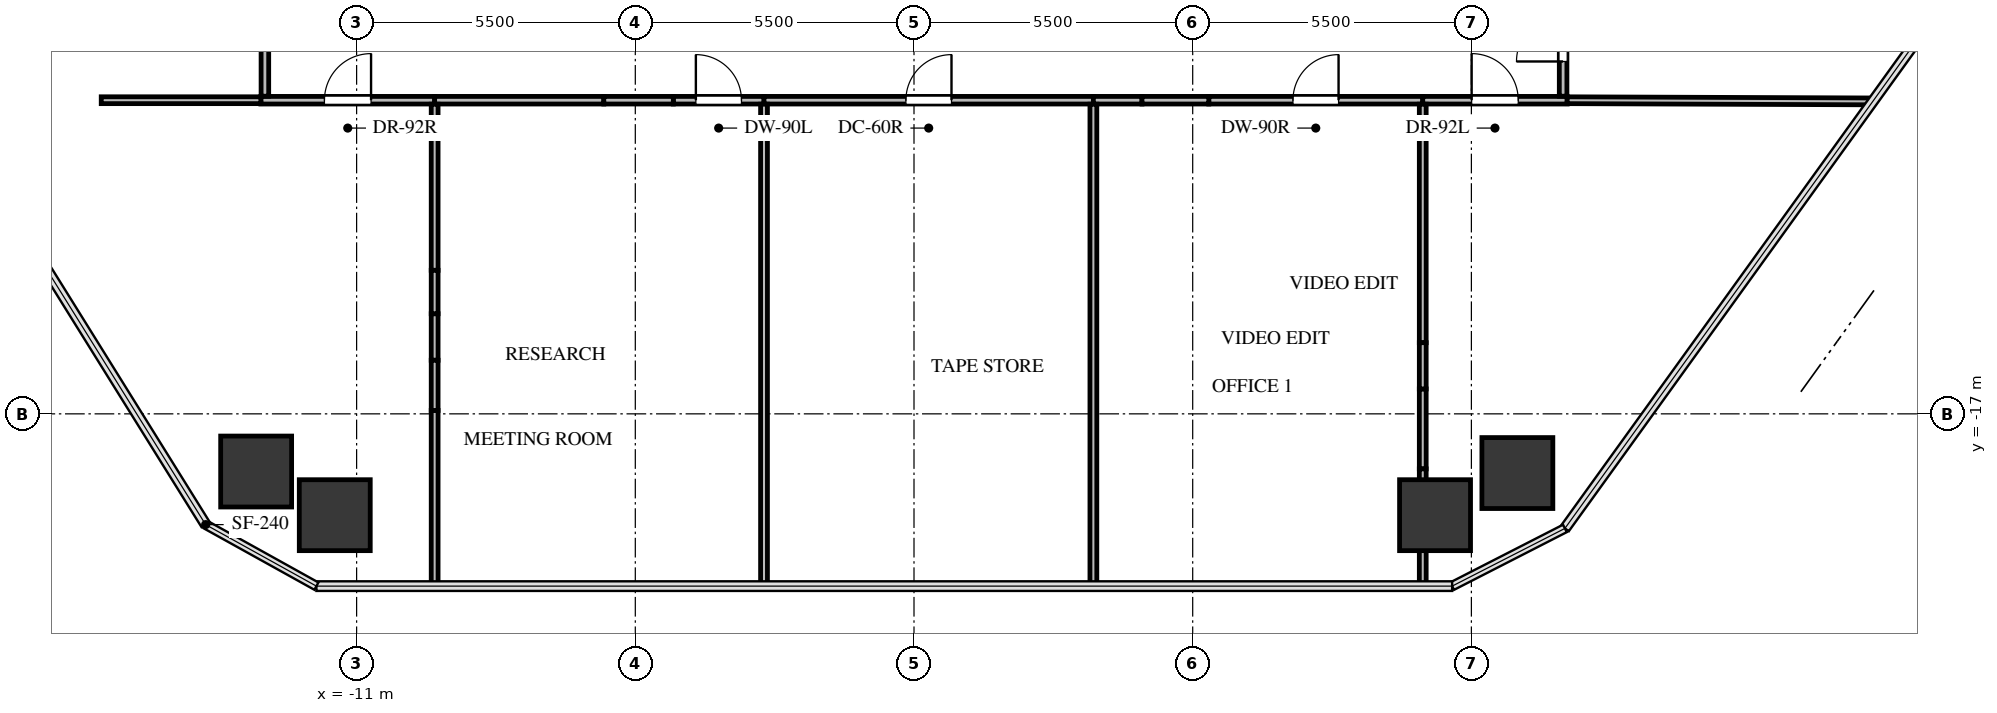
"""IFC4 building model, lengths in metres.
Left out: names, types, materials, properties, quantities, classifications, styles, units other than length and angle.
Written with IfcOpenShell. Run it as: python <this file> out.ifc"""

import sys

from ifc_helpers import new_model, si_unit, direction, frame, frame_2d, origin, origin_2d, place, context, subcontext, project, spatial, rectangle, extrude, source, transform, mapped, element, fill, save


model = new_model("IFC4")
c1 = context("Model", 3, precision=1e-05, world=origin(), true_north=direction((0.0, 1.0)))
c2 = subcontext(c1, "Body", "Model", "MODEL_VIEW")
j1 = project(units=[si_unit("LENGTHUNIT", "METRE"), si_unit("PLANEANGLEUNIT", "RADIAN")], contexts=[c1])
p1 = place(None, origin())
s1 = spatial("IfcSite", under=j1, at=p1, CompositionType="ELEMENT")
p2 = place(p1, origin())
s2 = spatial("IfcBuilding", under=s1, at=p2, CompositionType="ELEMENT")
p3 = place(p2, frame((0.0, 0.0, 39.0)))
s3 = spatial("IfcBuildingStorey", under=s2, at=p3, CompositionType="ELEMENT", Elevation=39.0)
m1 = source(origin(), c2, "Body", "SweptSolid", [
    extrude(rectangle(XDim=1.4, YDim=1.4, at=origin_2d()), origin(), (0.0, 0.0, 1.0), 3.3),
])
for number, where, z_axis, x_axis in (
    (1, (-12.983, -18.138, -0.24), (0.0, 0.0, 1.0), (1.0, 0.0, 0.0)),
    (2, (11.907, -18.168, -0.24), (0.0, 0.0, 1.0), (1.0, 0.0, 0.0)),
    (3, (10.283, -19.0, -0.24), (0.0, 0.0, 1.0), (1.0, 0.0, 0.0)),
    (4, (-11.431, -19.0, -0.24), (0.0, 0.0, 1.0), (1.0, 0.0, 0.0)),
):
    element("IfcColumn", number, at=place(p3, frame(where, z_axis=z_axis, x_axis=x_axis)), inside=s3, PredefinedType="COLUMN", context=c2, shape_type="MappedRepresentation", body=[
        mapped(m1, transform((0.0, 0.0, 0.0), x_axis=(1.0, 0.0, 0.0), y_axis=(0.0, 1.0, 0.0), z_axis=(0.0, 0.0, 1.0), scale=1.0)),
    ])
p4 = place(p3, frame((-12.89, -10.81, 0.0), z_axis=(0.0, 0.0, 1.0), x_axis=(1.0, 0.0, 0.0)))
e5 = element("IfcWall", 5, at=p4, inside=s3, PredefinedType="PARTITIONING", context=c2, shape_type="SweptSolid", body=[
    extrude(rectangle(XDim=3.43, YDim=0.15, at=frame_2d((1.715, 0.0))), origin(), (0.0, 0.0, 1.0), 3.045),
])
p5 = place(p4, frame((1.255, 0.0, 0.0)))
e6 = element("IfcOpeningElement", 6, at=p5, cuts=e5, PredefinedType="OPENING", context=c2, shape_type="SweptSolid", body=[
    extrude(rectangle(XDim=0.92, YDim=2.1, at=frame_2d((0.46, 1.05))), frame((0.0, 0.085, 0.0), z_axis=(0.0, -1.0, 0.0), x_axis=(1.0, 0.0, 0.0)), (0.0, 0.0, 1.0), 0.17),
])
p6 = place(p3, frame((-9.46, -10.81, 0.0), z_axis=(0.0, 0.0, 1.0), x_axis=(1.0, 0.0, 0.0)))
e7 = element("IfcWall", 7, at=p6, inside=s3, PredefinedType="PARTITIONING", context=c2, shape_type="SweptSolid", body=[
    extrude(rectangle(XDim=3.338, YDim=0.15, at=frame_2d((1.669, 0.0))), origin(), (0.0, 0.0, 1.0), 2.13),
])
p7 = place(p3, frame((-4.75, -10.81, 0.0), z_axis=(0.0, 0.0, 1.0), x_axis=(1.0, 0.0, 0.0)))
e8 = element("IfcWall", 8, at=p7, inside=s3, PredefinedType="PARTITIONING", context=c2, shape_type="SweptSolid", body=[
    extrude(rectangle(XDim=1.79, YDim=0.15, at=frame_2d((0.895, 0.0))), origin(), (0.0, 0.0, 1.0), 3.045),
])
p8 = place(p7, frame((0.445, 0.0, 0.0)))
e9 = element("IfcOpeningElement", 9, at=p8, cuts=e8, PredefinedType="OPENING", context=c2, shape_type="SweptSolid", body=[
    extrude(rectangle(XDim=0.9, YDim=2.05, at=frame_2d((0.45, 1.025))), frame((0.0, 0.085, 0.0), z_axis=(0.0, -1.0, 0.0), x_axis=(1.0, 0.0, 0.0)), (0.0, 0.0, 1.0), 0.17),
])
p9 = place(p3, frame((-6.122, -10.81, 0.0), z_axis=(0.0, 0.0, 1.0), x_axis=(1.0, 0.0, 0.0)))
e10 = element("IfcWall", 10, at=p9, inside=s3, PredefinedType="PARTITIONING", context=c2, shape_type="SweptSolid", body=[
    extrude(rectangle(XDim=1.372, YDim=0.15, at=frame_2d((0.686, 0.0))), origin(), (0.0, 0.0, 1.0), 2.13),
])
p10 = place(p3, frame((-2.96, -10.81, 0.0), z_axis=(0.0, 0.0, 1.0), x_axis=(1.0, 0.0, 0.0)))
e11 = element("IfcWall", 11, at=p10, inside=s3, PredefinedType="PARTITIONING", context=c2, shape_type="SweptSolid", body=[
    extrude(rectangle(XDim=6.5, YDim=0.15, at=frame_2d((3.25, 0.0))), origin(), (0.0, 0.0, 1.0), 3.045),
])
p11 = place(p10, frame((2.8, 0.0, 0.0)))
e12 = element("IfcOpeningElement", 12, at=p11, cuts=e11, PredefinedType="OPENING", context=c2, shape_type="SweptSolid", body=[
    extrude(rectangle(XDim=0.9, YDim=2.05, at=frame_2d((0.45, 1.025))), frame((0.0, 0.085, 0.0), z_axis=(0.0, -1.0, 0.0), x_axis=(1.0, 0.0, 0.0)), (0.0, 0.0, 1.0), 0.17),
])
p12 = place(p3, frame((3.54, -10.81, 0.0), z_axis=(0.0, 0.0, 1.0), x_axis=(1.0, 0.0, 0.0)))
e13 = element("IfcWall", 13, at=p12, inside=s3, PredefinedType="PARTITIONING", context=c2, shape_type="SweptSolid", body=[
    extrude(rectangle(XDim=0.959, YDim=0.15, at=frame_2d((0.479, 0.0))), origin(), (0.0, 0.0, 1.0), 3.045),
])
p13 = place(p3, frame((5.817, -10.81, 0.0), z_axis=(0.0, 0.0, 1.0), x_axis=(1.0, 0.0, 0.0)))
e14 = element("IfcWall", 14, at=p13, inside=s3, PredefinedType="PARTITIONING", context=c2, shape_type="SweptSolid", body=[
    extrude(rectangle(XDim=4.223, YDim=0.15, at=frame_2d((2.111, 0.0))), origin(), (0.0, 0.0, 1.0), 2.13),
])
p14 = place(p13, frame((1.661, 0.0, 0.0)))
e15 = element("IfcOpeningElement", 15, at=p14, cuts=e14, PredefinedType="OPENING", context=c2, shape_type="SweptSolid", body=[
    extrude(rectangle(XDim=0.9, YDim=2.05, at=frame_2d((0.45, 1.025))), frame((0.0, 0.085, 0.0), z_axis=(0.0, -1.0, 0.0), x_axis=(1.0, 0.0, 0.0)), (0.0, 0.0, 1.0), 0.17),
])
p15 = place(p3, frame((4.499, -10.81, 0.0), z_axis=(0.0, 0.0, 1.0), x_axis=(1.0, 0.0, 0.0)))
e16 = element("IfcWall", 16, at=p15, inside=s3, PredefinedType="PARTITIONING", context=c2, shape_type="SweptSolid", body=[
    extrude(rectangle(XDim=1.318, YDim=0.15, at=frame_2d((0.659, 0.0))), origin(), (0.0, 0.0, 1.0), 2.13),
])
p16 = place(p3, frame((10.04, -10.81, 0.0), z_axis=(0.0, 0.0, 1.0), x_axis=(1.0, 0.0, 0.0)))
e17 = element("IfcWall", 17, at=p16, inside=s3, PredefinedType="PARTITIONING", context=c2, shape_type="SweptSolid", body=[
    extrude(rectangle(XDim=2.85, YDim=0.15, at=frame_2d((1.425, 0.0))), origin(), (0.0, 0.0, 1.0), 3.045),
])
p17 = place(p16, frame((0.965, 0.0, 0.0)))
e18 = element("IfcOpeningElement", 18, at=p17, cuts=e17, PredefinedType="OPENING", context=c2, shape_type="SweptSolid", body=[
    extrude(rectangle(XDim=0.92, YDim=2.1, at=frame_2d((0.46, 1.05))), frame((0.0, 0.085, 0.0), z_axis=(0.0, -1.0, 0.0), x_axis=(1.0, 0.0, 0.0)), (0.0, 0.0, 1.0), 0.17),
])
p18 = place(p3, frame((-12.81, -4.96, 0.0), z_axis=(0.0, 0.0, 1.0), x_axis=(0.0, -1.0, 0.0)))
e19 = element("IfcWall", 19, at=p18, inside=s3, PredefinedType="PARTITIONING", context=c2, shape_type="SweptSolid", body=[
    extrude(rectangle(XDim=5.771, YDim=0.15, at=frame_2d((2.885, 0.0))), origin(), (0.0, 0.0, 1.0), 3.045),
])
p19 = place(p18, frame((2.41, 0.0, 0.0)))
e20 = element("IfcOpeningElement", 20, at=p19, cuts=e19, PredefinedType="OPENING", context=c2, shape_type="SweptSolid", body=[
    extrude(rectangle(XDim=0.95, YDim=2.1, at=frame_2d((0.475, 1.05))), frame((0.0, 0.085, 0.0), z_axis=(0.0, -1.0, 0.0), x_axis=(1.0, 0.0, 0.0)), (0.0, 0.0, 1.0), 0.17),
])
p20 = place(p3, frame((12.81, -10.731, 0.0), z_axis=(0.0, 0.0, 1.0), x_axis=(0.0, 1.0, 0.0)))
e21 = element("IfcWall", 21, at=p20, inside=s3, PredefinedType="PARTITIONING", context=c2, shape_type="SweptSolid", body=[
    extrude(rectangle(XDim=2.291, YDim=0.15, at=frame_2d((1.146, 0.0))), origin(), (0.0, 0.0, 1.0), 3.045),
])
p21 = place(p20, frame((0.686, 0.0, 0.0)))
e22 = element("IfcOpeningElement", 22, at=p21, cuts=e21, PredefinedType="OPENING", context=c2, shape_type="SweptSolid", body=[
    extrude(rectangle(XDim=0.92, YDim=2.1, at=frame_2d((0.46, 1.05))), frame((0.0, 0.085, 0.0), z_axis=(0.0, -1.0, 0.0), x_axis=(1.0, 0.0, 0.0)), (0.0, 0.0, 1.0), 0.17),
])
p22 = place(p3, frame((-9.46, -10.889, 0.0), z_axis=(0.0, 0.0, 1.0), x_axis=(0.0, -1.0, 0.0)))
e23 = element("IfcWall", 23, at=p22, inside=s3, PredefinedType="PARTITIONING", context=c2, shape_type="SweptSolid", body=[
    extrude(rectangle(XDim=3.278, YDim=0.135, at=frame_2d((1.639, 0.0))), origin(), (0.0, 0.0, 1.0), 2.13),
])
p23 = place(p3, frame((-9.46, -15.024, 0.0), z_axis=(0.0, 0.0, 1.0), x_axis=(0.0, -1.0, 0.0)))
e24 = element("IfcWall", 24, at=p23, inside=s3, PredefinedType="PARTITIONING", context=c2, shape_type="SweptSolid", body=[
    extrude(rectangle(XDim=0.918, YDim=0.135, at=frame_2d((0.459, 0.0))), origin(), (0.0, 0.0, 1.0), 2.13),
])
p24 = place(p3, frame((-9.46, -16.933, 0.0), z_axis=(0.0, 0.0, 1.0), x_axis=(0.0, -1.0, 0.0)))
e25 = element("IfcWall", 25, at=p24, inside=s3, PredefinedType="PARTITIONING", context=c2, shape_type="SweptSolid", body=[
    extrude(rectangle(XDim=3.467, YDim=0.135, at=frame_2d((1.733, 0.0))), origin(), (0.0, 0.0, 1.0), 2.13),
])
p25 = place(p3, frame((-9.46, -14.167, 0.0), z_axis=(0.0, 0.0, 1.0), x_axis=(0.0, -1.0, 0.0)))
e26 = element("IfcWall", 26, at=p25, inside=s3, PredefinedType="PARTITIONING", context=c2, shape_type="SweptSolid", body=[
    extrude(rectangle(XDim=0.857, YDim=0.135, at=frame_2d((0.428, 0.0))), origin(), (0.0, 0.0, 1.0), 2.13),
])
p26 = place(p3, frame((-9.46, -15.942, 0.0), z_axis=(0.0, 0.0, 1.0), x_axis=(0.0, -1.0, 0.0)))
e27 = element("IfcWall", 27, at=p26, inside=s3, PredefinedType="PARTITIONING", context=c2, shape_type="SweptSolid", body=[
    extrude(rectangle(XDim=0.99, YDim=0.135, at=frame_2d((0.495, 0.0))), origin(), (0.0, 0.0, 1.0), 2.13),
])
p27 = place(p3, frame((-16.04, -10.81, 0.0), z_axis=(0.0, 0.0, 1.0), x_axis=(1.0, 0.0, 0.0)))
e28 = element("IfcWall", 28, at=p27, inside=s3, PredefinedType="PARTITIONING", context=c2, shape_type="SweptSolid", body=[
    extrude(rectangle(XDim=3.15, YDim=0.135, at=frame_2d((1.575, 0.0))), origin(), (0.0, 0.0, 1.0), 3.045),
])
for number, where, z_axis, x_axis in (
    (29, (-2.96, -10.889, 0.0), (0.0, 0.0, 1.0), (0.0, -1.0, 0.0)),
    (30, (3.54, -10.889, 0.0), (0.0, 0.0, 1.0), (0.0, -1.0, 0.0)),
):
    element("IfcWall", number, at=place(p3, frame(where, z_axis=z_axis, x_axis=x_axis)), inside=s3, PredefinedType="PARTITIONING", context=c2, shape_type="SweptSolid", body=[
        extrude(rectangle(XDim=9.511, YDim=0.135, at=frame_2d((4.755, 0.0))), origin(), (0.0, 0.0, 1.0), 2.38),
    ])
p28 = place(p3, frame((10.04, -10.889, 0.0), z_axis=(0.0, 0.0, 1.0), x_axis=(0.0, -1.0, 0.0)))
e31 = element("IfcWall", 31, at=p28, inside=s3, PredefinedType="PARTITIONING", context=c2, shape_type="SweptSolid", body=[
    extrude(rectangle(XDim=4.707, YDim=0.135, at=frame_2d((2.354, 0.0))), origin(), (0.0, 0.0, 1.0), 2.13),
])
p29 = place(p3, frame((10.04, -16.509, 0.0), z_axis=(0.0, 0.0, 1.0), x_axis=(0.0, -1.0, 0.0)))
e32 = element("IfcWall", 32, at=p29, inside=s3, PredefinedType="PARTITIONING", context=c2, shape_type="SweptSolid", body=[
    extrude(rectangle(XDim=1.578, YDim=0.135, at=frame_2d((0.789, 0.0))), origin(), (0.0, 0.0, 1.0), 2.13),
])
p30 = place(p3, frame((10.04, -15.596, 0.0), z_axis=(0.0, 0.0, 1.0), x_axis=(0.0, -1.0, 0.0)))
e33 = element("IfcWall", 33, at=p30, inside=s3, PredefinedType="PARTITIONING", context=c2, shape_type="SweptSolid", body=[
    extrude(rectangle(XDim=0.913, YDim=0.135, at=frame_2d((0.457, 0.0))), origin(), (0.0, 0.0, 1.0), 2.13),
])
p31 = place(p3, frame((10.04, -18.086, 0.0), z_axis=(0.0, 0.0, 1.0), x_axis=(0.0, -1.0, 0.0)))
e34 = element("IfcWall", 34, at=p31, inside=s3, PredefinedType="PARTITIONING", context=c2, shape_type="SweptSolid", body=[
    extrude(rectangle(XDim=2.314, YDim=0.135, at=frame_2d((1.157, 0.0))), origin(), (0.0, 0.0, 1.0), 1.877),
])
p32 = place(p3, frame((12.89, -10.81, 0.0), z_axis=(0.0, 0.0, 1.0), x_axis=(0.999992607823, -0.003845035728, 0.0)))
e35 = element("IfcWall", 35, at=p32, inside=s3, PredefinedType="PARTITIONING", context=c2, shape_type="SweptSolid", body=[
    extrude(rectangle(XDim=6.032, YDim=0.135, at=frame_2d((3.016, 0.0))), origin(), (0.0, 0.0, 1.0), 2.38),
])
m2 = source(origin(), c2, "Body", "SweptSolid", [
    extrude(rectangle(XDim=0.92, YDim=2.1, at=frame_2d((0.46, 1.05))), frame((0.0, 0.025, 0.0), z_axis=(0.0, -1.0, 0.0), x_axis=(1.0, 0.0, 0.0)), (0.0, 0.0, 1.0), 0.05),
])
p33 = place(p5, origin())
e36 = element("IfcDoor", 36, at=p33, inside=s3, OperationType="SINGLE_SWING_RIGHT", PredefinedType="DOOR", context=c2, shape_type="MappedRepresentation", body=[
    mapped(m2, transform((0.0, 0.0, 0.0), x_axis=(1.0, 0.0, 0.0), y_axis=(0.0, 1.0, 0.0), z_axis=(0.0, 0.0, 1.0), scale=1.0)),
])
fill(e6, e36)
m3 = source(origin(), c2, "Body", "SweptSolid", [
    extrude(rectangle(XDim=0.9, YDim=2.05, at=frame_2d((0.45, 1.025))), frame((0.0, 0.025, 0.0), z_axis=(0.0, -1.0, 0.0), x_axis=(1.0, 0.0, 0.0)), (0.0, 0.0, 1.0), 0.05),
])
p34 = place(p8, origin())
e37 = element("IfcDoor", 37, at=p34, inside=s3, OperationType="SINGLE_SWING_LEFT", PredefinedType="DOOR", context=c2, shape_type="MappedRepresentation", body=[
    mapped(m3, transform((0.0, 0.0, 0.0), x_axis=(1.0, 0.0, 0.0), y_axis=(0.0, 1.0, 0.0), z_axis=(0.0, 0.0, 1.0), scale=1.0)),
])
fill(e9, e37)
m4 = source(origin(), c2, "Body", "SweptSolid", [
    extrude(rectangle(XDim=0.9, YDim=2.05, at=frame_2d((0.45, 1.025))), frame((0.0, 0.025, 0.0), z_axis=(0.0, -1.0, 0.0), x_axis=(1.0, 0.0, 0.0)), (0.0, 0.0, 1.0), 0.05),
])
p35 = place(p11, origin())
e38 = element("IfcDoor", 38, at=p35, inside=s3, OperationType="SINGLE_SWING_RIGHT", PredefinedType="DOOR", context=c2, shape_type="MappedRepresentation", body=[
    mapped(m4, transform((0.0, 0.0, 0.0), x_axis=(1.0, 0.0, 0.0), y_axis=(0.0, 1.0, 0.0), z_axis=(0.0, 0.0, 1.0), scale=1.0)),
])
fill(e12, e38)
m5 = source(origin(), c2, "Body", "SweptSolid", [
    extrude(rectangle(XDim=0.9, YDim=2.05, at=frame_2d((0.45, 1.025))), frame((0.0, 0.025, 0.0), z_axis=(0.0, -1.0, 0.0), x_axis=(1.0, 0.0, 0.0)), (0.0, 0.0, 1.0), 0.05),
])
p36 = place(p14, origin())
e39 = element("IfcDoor", 39, at=p36, inside=s3, OperationType="SINGLE_SWING_RIGHT", PredefinedType="DOOR", context=c2, shape_type="MappedRepresentation", body=[
    mapped(m5, transform((0.0, 0.0, 0.0), x_axis=(1.0, 0.0, 0.0), y_axis=(0.0, 1.0, 0.0), z_axis=(0.0, 0.0, 1.0), scale=1.0)),
])
fill(e15, e39)
m6 = source(origin(), c2, "Body", "SweptSolid", [
    extrude(rectangle(XDim=0.92, YDim=2.1, at=frame_2d((0.46, 1.05))), frame((0.0, 0.025, 0.0), z_axis=(0.0, -1.0, 0.0), x_axis=(1.0, 0.0, 0.0)), (0.0, 0.0, 1.0), 0.05),
])
p37 = place(p17, origin())
e40 = element("IfcDoor", 40, at=p37, inside=s3, OperationType="SINGLE_SWING_LEFT", PredefinedType="DOOR", context=c2, shape_type="MappedRepresentation", body=[
    mapped(m6, transform((0.0, 0.0, 0.0), x_axis=(1.0, 0.0, 0.0), y_axis=(0.0, 1.0, 0.0), z_axis=(0.0, 0.0, 1.0), scale=1.0)),
])
fill(e18, e40)
p38 = place(p21, origin())
e41 = element("IfcDoor", 41, at=p38, inside=s3, OperationType="SINGLE_SWING_LEFT", PredefinedType="DOOR", context=c2, shape_type="MappedRepresentation", body=[
    mapped(m6, transform((0.0, 0.0, 0.0), x_axis=(1.0, 0.0, 0.0), y_axis=(0.0, 1.0, 0.0), z_axis=(0.0, 0.0, 1.0), scale=1.0)),
])
fill(e22, e41)
save(model, sys.argv[1])
